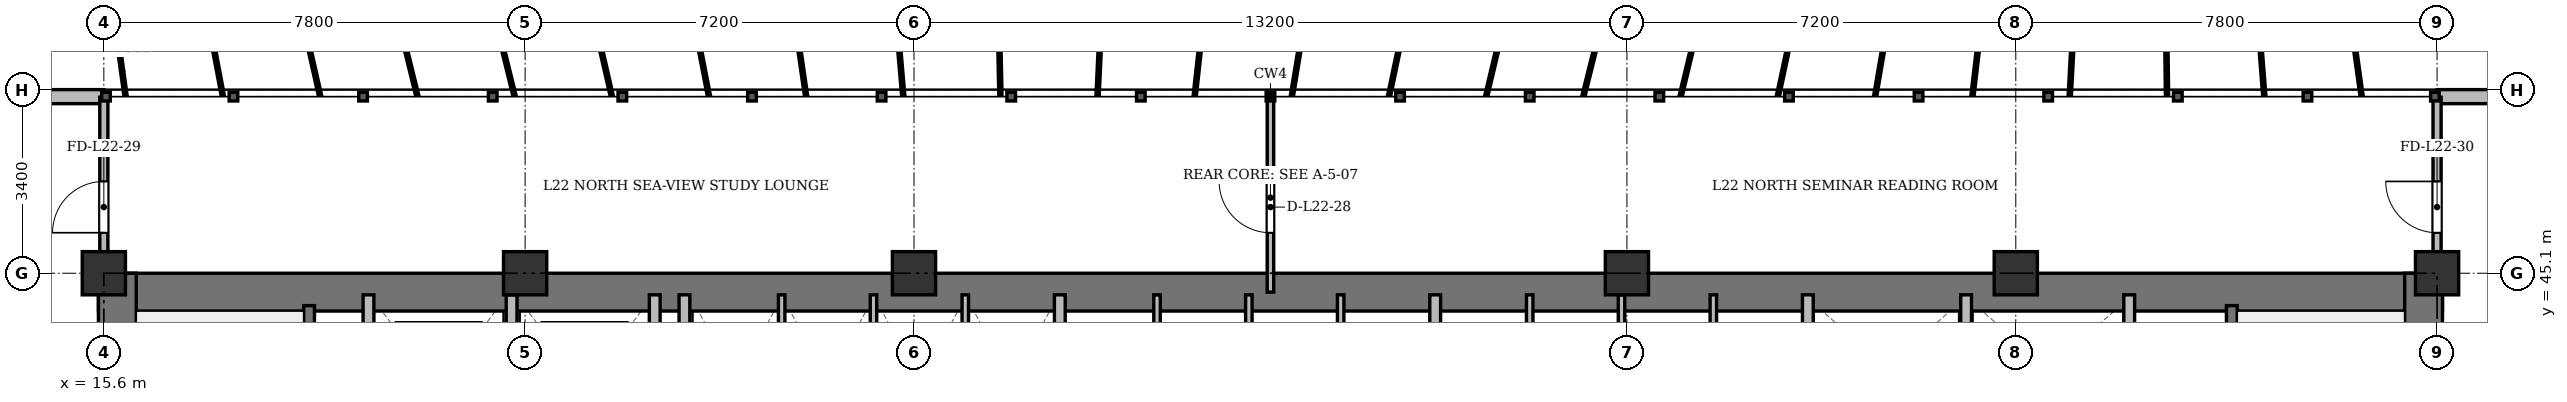
"""IFC4 building model, lengths in metres.
Left out: names, types, materials, properties, quantities, classifications, styles, units other than length and angle.
Written with IfcOpenShell. Run it as: python <this file> out.ifc"""

import sys

from ifc_helpers import new_model, si_unit, direction, frame, frame_2d, origin, origin_2d, place, context, subcontext, project, spatial, rectangle, extrude, source, transform, mapped, element, fill, save


model = new_model("IFC4")
c1 = context("Model", 3, precision=1e-05, world=origin(), true_north=direction((0.0, 1.0)))
c2 = subcontext(c1, "Body", "Model", "MODEL_VIEW")
j1 = project(units=[si_unit("LENGTHUNIT", "METRE"), si_unit("PLANEANGLEUNIT", "RADIAN")], contexts=[c1])
p1 = place(None, origin())
s1 = spatial("IfcSite", under=j1, at=p1, CompositionType="ELEMENT")
p2 = place(p1, origin())
s2 = spatial("IfcBuilding", under=s1, at=p2, CompositionType="ELEMENT")
p3 = place(p2, frame((0.0, 0.0, 88.9)))
s3 = spatial("IfcBuildingStorey", under=s2, at=p3, CompositionType="ELEMENT", Elevation=88.9)
m1 = source(origin(), c2, "Body", "SweptSolid", [
    extrude(rectangle(XDim=0.8, YDim=0.8, at=origin_2d()), origin(), (0.0, 0.0, 1.0), 3.6),
])
for number, where, z_axis, x_axis in (
    (1, (15.6, 45.1, 0.0), (0.0, 0.0, 1.0), (1.0, 0.0, 0.0)),
    (2, (23.4, 45.1, 0.0), (0.0, 0.0, 1.0), (1.0, 0.0, 0.0)),
    (3, (30.6, 45.1, 0.0), (0.0, 0.0, 1.0), (1.0, 0.0, 0.0)),
    (4, (43.8, 45.1, 0.0), (0.0, 0.0, 1.0), (1.0, 0.0, 0.0)),
    (5, (51.0, 45.1, 0.0), (0.0, 0.0, 1.0), (1.0, 0.0, 0.0)),
    (6, (58.8, 45.1, 0.0), (0.0, 0.0, 1.0), (1.0, 0.0, 0.0)),
):
    element("IfcColumn", number, at=place(p3, frame(where, z_axis=z_axis, x_axis=x_axis)), inside=s3, PredefinedType="COLUMN", context=c2, shape_type="MappedRepresentation", body=[
        mapped(m1, transform((0.0, 0.0, 0.0), x_axis=(1.0, 0.0, 0.0), y_axis=(0.0, 1.0, 0.0), z_axis=(0.0, 0.0, 1.0), scale=1.0)),
    ])
p4 = place(p3, frame((7.6, 48.37, 0.0), z_axis=(0.0, 0.0, 1.0), x_axis=(1.0, 0.0, 0.0)))
e7 = element("IfcWall", 7, at=p4, inside=s3, PredefinedType="SOLIDWALL", context=c2, shape_type="SweptSolid", body=[
    extrude(rectangle(XDim=8.0, YDim=0.26, at=frame_2d((4.0, 0.0))), origin(), (0.0, 0.0, 1.0), 3.34),
])
p5 = place(p4, frame((3.308, 0.0, 0.9)))
e8 = element("IfcOpeningElement", 8, at=p5, cuts=e7, PredefinedType="OPENING", context=c2, shape_type="SweptSolid", body=[
    extrude(rectangle(XDim=1.2, YDim=1.65, at=frame_2d((0.6, 0.825))), frame((0.0, 0.14, 0.0), z_axis=(0.0, -1.0, 0.0), x_axis=(1.0, 0.0, 0.0)), (0.0, 0.0, 1.0), 0.28),
])
p6 = place(p3, frame((58.8, 48.37, 0.0), z_axis=(0.0, 0.0, 1.0), x_axis=(1.0, 0.0, 0.0)))
e9 = element("IfcWall", 9, at=p6, inside=s3, PredefinedType="SOLIDWALL", context=c2, shape_type="SweptSolid", body=[
    extrude(rectangle(XDim=8.0, YDim=0.26, at=frame_2d((4.0, 0.0))), origin(), (0.0, 0.0, 1.0), 3.34),
])
p7 = place(p6, frame((2.192, 0.0, 0.9)))
e10 = element("IfcOpeningElement", 10, at=p7, cuts=e9, PredefinedType="OPENING", context=c2, shape_type="SweptSolid", body=[
    extrude(rectangle(XDim=1.2, YDim=1.65, at=frame_2d((0.6, 0.825))), frame((0.0, 0.14, 0.0), z_axis=(0.0, -1.0, 0.0), x_axis=(1.0, 0.0, 0.0)), (0.0, 0.0, 1.0), 0.28),
])
p8 = place(p6, frame((6.033, 0.0, 0.9)))
e11 = element("IfcOpeningElement", 11, at=p8, cuts=e9, PredefinedType="OPENING", context=c2, shape_type="SweptSolid", body=[
    extrude(rectangle(XDim=1.2, YDim=1.65, at=frame_2d((0.6, 0.825))), frame((0.0, 0.14, 0.0), z_axis=(0.0, -1.0, 0.0), x_axis=(1.0, 0.0, 0.0)), (0.0, 0.0, 1.0), 0.28),
])
p9 = place(p3, frame((15.5, 44.75, 0.0), z_axis=(0.0, 0.0, 1.0), x_axis=(1.0, 0.0, 0.0)))
e12 = element("IfcWall", 12, at=p9, inside=s3, PredefinedType="SHEAR", context=c2, shape_type="SweptSolid", body=[
    extrude(rectangle(XDim=43.4, YDim=0.7, at=frame_2d((21.7, 0.0))), origin(), (0.0, 0.0, 1.0), 3.34),
])
for number, where, z_axis, x_axis in (
    (13, (15.85, 33.4, 0.0), (0.0, 0.0, 1.0), (0.0, 1.0, 0.0)),
    (14, (58.55, 33.4, 0.0), (0.0, 0.0, 1.0), (0.0, 1.0, 0.0)),
):
    element("IfcWall", number, at=place(p3, frame(where, z_axis=z_axis, x_axis=x_axis)), inside=s3, PredefinedType="SHEAR", context=c2, shape_type="SweptSolid", body=[
        extrude(rectangle(XDim=11.7, YDim=0.7, at=frame_2d((5.85, 0.0))), origin(), (0.0, 0.0, 1.0), 3.34),
    ])
p10 = place(p3, frame((19.4, 33.4, 0.0), z_axis=(0.0, 0.0, 1.0), x_axis=(0.0, 1.0, 0.0)))
e15 = element("IfcWall", 15, at=p10, inside=s3, PredefinedType="SHEAR", context=c2, shape_type="SweptSolid", body=[
    extrude(rectangle(XDim=11.1, YDim=0.2, at=frame_2d((5.55, 0.0))), origin(), (0.0, 0.0, 1.0), 3.34),
])
p11 = place(p10, frame((0.85, 0.0, 0.0)))
e16 = element("IfcOpeningElement", 16, at=p11, cuts=e15, PredefinedType="OPENING", context=c2, shape_type="SweptSolid", body=[
    extrude(rectangle(XDim=1.1, YDim=2.15, at=frame_2d((0.55, 1.075))), frame((0.0, 0.11, 0.0), z_axis=(0.0, -1.0, 0.0), x_axis=(1.0, 0.0, 0.0)), (0.0, 0.0, 1.0), 0.22),
])
p12 = place(p3, frame((55.0, 33.4, 0.0), z_axis=(0.0, 0.0, 1.0), x_axis=(0.0, 1.0, 0.0)))
e17 = element("IfcWall", 17, at=p12, inside=s3, PredefinedType="SHEAR", context=c2, shape_type="SweptSolid", body=[
    extrude(rectangle(XDim=11.1, YDim=0.2, at=frame_2d((5.55, 0.0))), origin(), (0.0, 0.0, 1.0), 3.34),
])
p13 = place(p12, frame((0.85, 0.0, 0.0)))
e18 = element("IfcOpeningElement", 18, at=p13, cuts=e17, PredefinedType="OPENING", context=c2, shape_type="SweptSolid", body=[
    extrude(rectangle(XDim=1.1, YDim=2.15, at=frame_2d((0.55, 1.075))), frame((0.0, 0.11, 0.0), z_axis=(0.0, -1.0, 0.0), x_axis=(1.0, 0.0, 0.0)), (0.0, 0.0, 1.0), 0.22),
])
for number, where, z_axis, x_axis in (
    (19, (20.5, 41.3, 0.0), (0.0, 0.0, 1.0), (0.0, 1.0, 0.0)),
    (20, (23.15, 41.3, 0.0), (0.0, 0.0, 1.0), (0.0, 1.0, 0.0)),
    (21, (25.8, 41.3, 0.0), (0.0, 0.0, 1.0), (0.0, 1.0, 0.0)),
):
    element("IfcWall", number, at=place(p3, frame(where, z_axis=z_axis, x_axis=x_axis)), inside=s3, PredefinedType="SOLIDWALL", context=c2, shape_type="SweptSolid", body=[
        extrude(rectangle(XDim=3.4, YDim=0.2, at=frame_2d((1.7, 0.0))), origin(), (0.0, 0.0, 1.0), 3.34),
    ])
p14 = place(p3, frame((26.35, 33.4, 0.0), z_axis=(0.0, 0.0, 1.0), x_axis=(0.0, 1.0, 0.0)))
e22 = element("IfcWall", 22, at=p14, inside=s3, PredefinedType="SOLIDWALL", context=c2, shape_type="SweptSolid", body=[
    extrude(rectangle(XDim=11.3, YDim=0.2, at=frame_2d((5.65, 0.0))), origin(), (0.0, 0.0, 1.0), 2.752),
])
p15 = place(p3, frame((33.3, 41.5, 0.0), z_axis=(0.0, 0.0, 1.0), x_axis=(0.0, 1.0, 0.0)))
e23 = element("IfcWall", 23, at=p15, inside=s3, PredefinedType="SOLIDWALL", context=c2, shape_type="SweptSolid", body=[
    extrude(rectangle(XDim=3.2, YDim=0.2, at=frame_2d((1.6, 0.0))), origin(), (0.0, 0.0, 1.0), 3.34),
])
for number, where, z_axis, x_axis in (
    (24, (28.15, 41.5, 0.0), (0.0, 0.0, 1.0), (0.0, 1.0, 0.0)),
    (25, (29.85, 41.5, 0.0), (0.0, 0.0, 1.0), (0.0, 1.0, 0.0)),
    (26, (31.55, 41.5, 0.0), (0.0, 0.0, 1.0), (0.0, 1.0, 0.0)),
    (27, (35.1, 41.5, 0.0), (0.0, 0.0, 1.0), (0.0, 1.0, 0.0)),
    (28, (36.8, 41.5, 0.0), (0.0, 0.0, 1.0), (0.0, 1.0, 0.0)),
    (29, (38.5, 41.5, 0.0), (0.0, 0.0, 1.0), (0.0, 1.0, 0.0)),
):
    element("IfcWall", number, at=place(p3, frame(where, z_axis=z_axis, x_axis=x_axis)), inside=s3, PredefinedType="PARTITIONING", context=c2, shape_type="SweptSolid", body=[
        extrude(rectangle(XDim=3.2, YDim=0.12, at=frame_2d((1.6, 0.0))), origin(), (0.0, 0.0, 1.0), 3.34),
    ])
p16 = place(p3, frame((40.25, 41.5, 0.0), z_axis=(0.0, 0.0, 1.0), x_axis=(0.0, 1.0, 0.0)))
e30 = element("IfcWall", 30, at=p16, inside=s3, PredefinedType="SOLIDWALL", context=c2, shape_type="SweptSolid", body=[
    extrude(rectangle(XDim=3.2, YDim=0.2, at=frame_2d((1.6, 0.0))), origin(), (0.0, 0.0, 1.0), 3.34),
])
p17 = place(p3, frame((42.0, 41.5, 0.0), z_axis=(0.0, 0.0, 1.0), x_axis=(0.0, 1.0, 0.0)))
e31 = element("IfcWall", 31, at=p17, inside=s3, PredefinedType="PARTITIONING", context=c2, shape_type="SweptSolid", body=[
    extrude(rectangle(XDim=3.2, YDim=0.12, at=frame_2d((1.6, 0.0))), origin(), (0.0, 0.0, 1.0), 3.34),
])
p18 = place(p3, frame((43.7, 41.5, 0.0), z_axis=(0.0, 0.0, 1.0), x_axis=(0.0, 1.0, 0.0)))
e32 = element("IfcWall", 32, at=p18, inside=s3, PredefinedType="PARTITIONING", context=c2, shape_type="SweptSolid", body=[
    extrude(rectangle(XDim=3.2, YDim=0.12, at=frame_2d((1.6, 0.0))), origin(), (0.0, 0.0, 1.0), 2.84),
])
p19 = place(p3, frame((45.4, 41.5, 0.0), z_axis=(0.0, 0.0, 1.0), x_axis=(0.0, 1.0, 0.0)))
e33 = element("IfcWall", 33, at=p19, inside=s3, PredefinedType="PARTITIONING", context=c2, shape_type="SweptSolid", body=[
    extrude(rectangle(XDim=3.2, YDim=0.12, at=frame_2d((1.6, 0.0))), origin(), (0.0, 0.0, 1.0), 3.34),
])
p20 = place(p3, frame((47.15, 33.4, 0.0), z_axis=(0.0, 0.0, 1.0), x_axis=(0.0, 1.0, 0.0)))
e34 = element("IfcWall", 34, at=p20, inside=s3, PredefinedType="SOLIDWALL", context=c2, shape_type="SweptSolid", body=[
    extrude(rectangle(XDim=11.3, YDim=0.2, at=frame_2d((5.65, 0.0))), origin(), (0.0, 0.0, 1.0), 2.752),
])
for number, where, z_axis, x_axis in (
    (35, (50.08, 42.05, 0.0), (0.0, 0.0, 1.0), (0.0, 1.0, 0.0)),
    (36, (53.1, 42.05, 0.0), (0.0, 0.0, 1.0), (0.0, 1.0, 0.0)),
):
    element("IfcWall", number, at=place(p3, frame(where, z_axis=z_axis, x_axis=x_axis)), inside=s3, PredefinedType="SOLIDWALL", context=c2, shape_type="SweptSolid", body=[
        extrude(rectangle(XDim=2.65, YDim=0.2, at=frame_2d((1.325, 0.0))), origin(), (0.0, 0.0, 1.0), 3.34),
    ])
p21 = place(p3, frame((37.2, 44.75, 0.0), z_axis=(0.0, 0.0, 1.0), x_axis=(0.0, 1.0, 0.0)))
e37 = element("IfcWall", 37, at=p21, inside=s3, PredefinedType="PARTITIONING", context=c2, shape_type="SweptSolid", body=[
    extrude(rectangle(XDim=3.61, YDim=0.12, at=frame_2d((1.805, 0.0))), origin(), (0.0, 0.0, 1.0), 2.752),
])
p22 = place(p21, frame((1.1, 0.0, 0.0)))
e38 = element("IfcOpeningElement", 38, at=p22, cuts=e37, PredefinedType="OPENING", context=c2, shape_type="SweptSolid", body=[
    extrude(rectangle(XDim=0.95, YDim=2.15, at=frame_2d((0.475, 1.075))), frame((0.0, 0.07, 0.0), z_axis=(0.0, -1.0, 0.0), x_axis=(1.0, 0.0, 0.0)), (0.0, 0.0, 1.0), 0.14),
])
p23 = place(p3, frame((15.6, 44.75, 0.0), z_axis=(0.0, 0.0, 1.0), x_axis=(0.0, 1.0, 0.0)))
e39 = element("IfcWall", 39, at=p23, inside=s3, PredefinedType="PARTITIONING", context=c2, shape_type="SweptSolid", body=[
    extrude(rectangle(XDim=3.61, YDim=0.15, at=frame_2d((1.805, 0.0))), origin(), (0.0, 0.0, 1.0), 2.84),
])
p24 = place(p23, frame((1.1, 0.0, 0.0)))
e40 = element("IfcOpeningElement", 40, at=p24, cuts=e39, PredefinedType="OPENING", context=c2, shape_type="SweptSolid", body=[
    extrude(rectangle(XDim=0.95, YDim=2.15, at=frame_2d((0.475, 1.075))), frame((0.0, 0.085, 0.0), z_axis=(0.0, -1.0, 0.0), x_axis=(1.0, 0.0, 0.0)), (0.0, 0.0, 1.0), 0.17),
])
p25 = place(p3, frame((58.8, 44.75, 0.0), z_axis=(0.0, 0.0, 1.0), x_axis=(0.0, 1.0, 0.0)))
e41 = element("IfcWall", 41, at=p25, inside=s3, PredefinedType="PARTITIONING", context=c2, shape_type="SweptSolid", body=[
    extrude(rectangle(XDim=3.61, YDim=0.15, at=frame_2d((1.805, 0.0))), origin(), (0.0, 0.0, 1.0), 2.84),
])
p26 = place(p25, frame((1.1, 0.0, 0.0)))
e42 = element("IfcOpeningElement", 42, at=p26, cuts=e41, PredefinedType="OPENING", context=c2, shape_type="SweptSolid", body=[
    extrude(rectangle(XDim=0.95, YDim=2.15, at=frame_2d((0.475, 1.075))), frame((0.0, 0.085, 0.0), z_axis=(0.0, -1.0, 0.0), x_axis=(1.0, 0.0, 0.0)), (0.0, 0.0, 1.0), 0.17),
])
m2 = source(origin(), c2, "Body", "SweptSolid", [
    extrude(rectangle(XDim=0.95, YDim=2.15, at=frame_2d((0.475, 1.075))), frame((0.0, 0.025, 0.0), z_axis=(0.0, -1.0, 0.0), x_axis=(1.0, 0.0, 0.0)), (0.0, 0.0, 1.0), 0.05),
])
p27 = place(p22, origin())
e43 = element("IfcDoor", 43, at=p27, inside=s3, OperationType="SINGLE_SWING_RIGHT", PredefinedType="DOOR", context=c2, shape_type="MappedRepresentation", body=[
    mapped(m2, transform((0.0, 0.0, 0.0), x_axis=(1.0, 0.0, 0.0), y_axis=(0.0, 1.0, 0.0), z_axis=(0.0, 0.0, 1.0), scale=1.0)),
])
fill(e38, e43)
p28 = place(p24, origin())
e44 = element("IfcDoor", 44, at=p28, inside=s3, OperationType="SINGLE_SWING_LEFT", PredefinedType="DOOR", context=c2, shape_type="MappedRepresentation", body=[
    mapped(m2, transform((0.0, 0.0, 0.0), x_axis=(1.0, 0.0, 0.0), y_axis=(0.0, 1.0, 0.0), z_axis=(0.0, 0.0, 1.0), scale=1.0)),
])
fill(e40, e44)
p29 = place(p26, origin())
e45 = element("IfcDoor", 45, at=p29, inside=s3, OperationType="SINGLE_SWING_RIGHT", PredefinedType="DOOR", context=c2, shape_type="MappedRepresentation", body=[
    mapped(m2, transform((0.0, 0.0, 0.0), x_axis=(1.0, 0.0, 0.0), y_axis=(0.0, 1.0, 0.0), z_axis=(0.0, 0.0, 1.0), scale=1.0)),
])
fill(e42, e45)
save(model, sys.argv[1])
